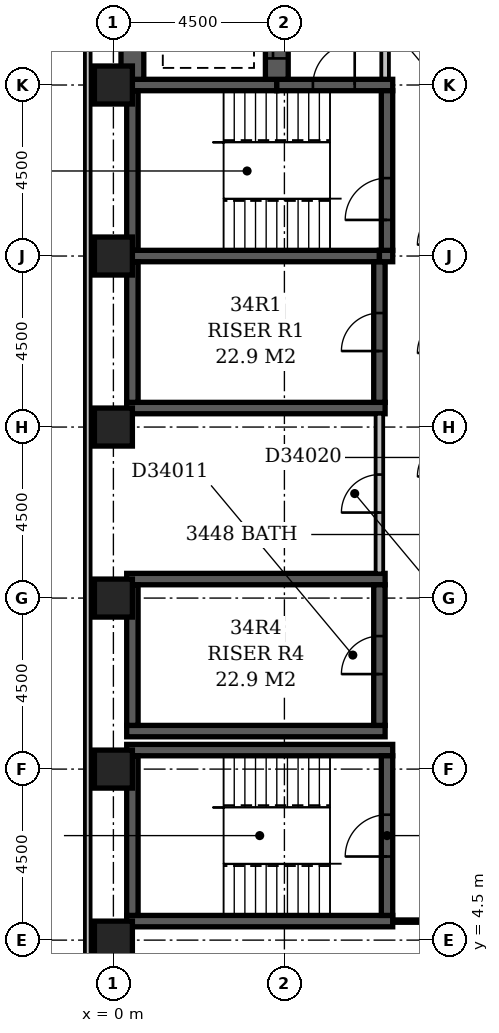
"""IFC4 building model, lengths in metres.
Left out: names, types, materials, properties, quantities, classifications, styles, units other than length and angle.
Written with IfcOpenShell. Run it as: python <this file> out.ifc"""

import sys

from ifc_helpers import new_model, si_unit, direction, frame, frame_2d, origin, origin_2d, place, context, subcontext, project, spatial, rectangle, extrude, element, fill, save


model = new_model("IFC4")
c1 = context("Model", 3, precision=1e-05, world=origin(), true_north=direction((0.0, 1.0)))
c2 = subcontext(c1, "Body", "Model", "MODEL_VIEW")
j1 = project(units=[si_unit("LENGTHUNIT", "METRE"), si_unit("PLANEANGLEUNIT", "RADIAN")], contexts=[c1])
p1 = place(None, origin())
s1 = spatial("IfcSite", under=j1, at=p1, CompositionType="ELEMENT")
p2 = place(p1, origin())
s2 = spatial("IfcBuilding", under=s1, at=p2, CompositionType="ELEMENT")
p3 = place(p2, frame((0.0, 0.0, 137.6)))
s3 = spatial("IfcBuildingStorey", under=s2, at=p3, CompositionType="ELEMENT", Elevation=137.6)
for number, where, z_axis, x_axis in (
    (1, (0.35, 5.0, -0.3), (0.0, 0.0, 1.0), (1.0, 0.0, 0.0)),
    (2, (0.35, 9.5, -0.3), (0.0, 0.0, 1.0), (1.0, 0.0, 0.0)),
):
    element("IfcWall", number, at=place(p3, frame(where, z_axis=z_axis, x_axis=x_axis)), inside=s3, PredefinedType="SHEAR", context=c2, shape_type="SweptSolid", body=[
        extrude(rectangle(XDim=7.0, YDim=0.3, at=frame_2d((3.5, 0.0))), origin(), (0.0, 0.0, 1.0), 3.6),
    ])
for number, where, z_axis, x_axis in (
    (3, (0.35, 10.0, -0.3), (0.0, 0.0, 1.0), (1.0, 0.0, 0.0)),
    (4, (0.35, 14.0, -0.3), (0.0, 0.0, 1.0), (1.0, 0.0, 0.0)),
    (5, (0.35, 18.5, -0.3), (0.0, 0.0, 1.0), (1.0, 0.0, 0.0)),
):
    element("IfcWall", number, at=place(p3, frame(where, z_axis=z_axis, x_axis=x_axis)), inside=s3, PredefinedType="SHEAR", context=c2, shape_type="SweptSolid", body=[
        extrude(rectangle(XDim=6.8, YDim=0.3, at=frame_2d((3.4, 0.0))), origin(), (0.0, 0.0, 1.0), 3.6),
    ])
p4 = place(p3, frame((0.35, 22.5, -0.3), z_axis=(0.0, 0.0, 1.0), x_axis=(1.0, 0.0, 0.0)))
e6 = element("IfcWall", 6, at=p4, inside=s3, PredefinedType="SHEAR", context=c2, shape_type="SweptSolid", body=[
    extrude(rectangle(XDim=6.65, YDim=0.3, at=frame_2d((3.325, 0.0))), origin(), (0.0, 0.0, 1.0), 3.6),
])
p5 = place(p3, frame((0.35, 27.0, -0.3), z_axis=(0.0, 0.0, 1.0), x_axis=(1.0, 0.0, 0.0)))
e7 = element("IfcWall", 7, at=p5, inside=s3, PredefinedType="SHEAR", context=c2, shape_type="SweptSolid", body=[
    extrude(rectangle(XDim=3.95, YDim=0.3, at=frame_2d((1.975, 0.0))), origin(), (0.0, 0.0, 1.0), 3.6),
])
p6 = place(p3, frame((0.5, 5.15, -0.3), z_axis=(0.0, 0.0, 1.0), x_axis=(0.0, 1.0, 0.0)))
e8 = element("IfcWall", 8, at=p6, inside=s3, PredefinedType="SHEAR", context=c2, shape_type="SweptSolid", body=[
    extrude(rectangle(XDim=4.2, YDim=0.3, at=frame_2d((2.1, 0.0))), origin(), (0.0, 0.0, 1.0), 3.6),
])
for number, where, z_axis, x_axis in (
    (9, (0.5, 10.15, -0.3), (0.0, 0.0, 1.0), (0.0, 1.0, 0.0)),
    (10, (0.5, 18.65, -0.3), (0.0, 0.0, 1.0), (0.0, 1.0, 0.0)),
):
    element("IfcWall", number, at=place(p3, frame(where, z_axis=z_axis, x_axis=x_axis)), inside=s3, PredefinedType="SHEAR", context=c2, shape_type="SweptSolid", body=[
        extrude(rectangle(XDim=3.7, YDim=0.3, at=frame_2d((1.85, 0.0))), origin(), (0.0, 0.0, 1.0), 3.6),
    ])
p7 = place(p3, frame((0.5, 22.65, -0.3), z_axis=(0.0, 0.0, 1.0), x_axis=(0.0, 1.0, 0.0)))
e11 = element("IfcWall", 11, at=p7, inside=s3, PredefinedType="SHEAR", context=c2, shape_type="SweptSolid", body=[
    extrude(rectangle(XDim=4.2, YDim=0.3, at=frame_2d((2.1, 0.0))), origin(), (0.0, 0.0, 1.0), 3.6),
])
p8 = place(p3, frame((0.5, 27.15, -0.3), z_axis=(0.0, 0.0, 1.0), x_axis=(0.0, 1.0, 0.0)))
e12 = element("IfcWall", 12, at=p8, inside=s3, PredefinedType="SHEAR", context=c2, shape_type="SweptSolid", body=[
    extrude(rectangle(XDim=22.05, YDim=0.6, at=frame_2d((11.025, 0.0))), origin(), (0.0, 0.0, 1.0), 3.6),
])
p9 = place(p3, frame((4.3, 27.0, -0.3), z_axis=(0.0, 0.0, 1.0), x_axis=(1.0, 0.0, 0.0)))
e13 = element("IfcWall", 13, at=p9, inside=s3, PredefinedType="SHEAR", context=c2, shape_type="SweptSolid", body=[
    extrude(rectangle(XDim=3.05, YDim=0.3, at=frame_2d((1.525, 0.0))), origin(), (0.0, 0.0, 1.0), 3.6),
])
p10 = place(p9, frame((0.95, 0.0, 0.3)))
e14 = element("IfcOpeningElement", 14, at=p10, cuts=e13, PredefinedType="OPENING", context=c2, shape_type="SweptSolid", body=[
    extrude(rectangle(XDim=1.1, YDim=2.1, at=frame_2d((0.55, 1.05))), frame((0.0, 0.162, 0.0), z_axis=(0.0, -1.0, 0.0), x_axis=(1.0, 0.0, 0.0)), (0.0, 0.0, 1.0), 0.324),
])
p11 = place(p3, frame((4.3, 27.15, -0.3), z_axis=(0.0, 0.0, 1.0), x_axis=(0.0, 1.0, 0.0)))
e15 = element("IfcWall", 15, at=p11, inside=s3, PredefinedType="SHEAR", context=c2, shape_type="SweptSolid", body=[
    extrude(rectangle(XDim=22.05, YDim=0.6, at=frame_2d((11.025, 0.0))), origin(), (0.0, 0.0, 1.0), 3.6),
])
p12 = place(p11, frame((3.05, 0.0, 0.3)))
e16 = element("IfcOpeningElement", 16, at=p12, cuts=e15, PredefinedType="OPENING", context=c2, shape_type="SweptSolid", body=[
    extrude(rectangle(XDim=1.1, YDim=2.1, at=frame_2d((0.55, 1.05))), frame((0.0, 0.312, 0.0), z_axis=(0.0, -1.0, 0.0), x_axis=(1.0, 0.0, 0.0)), (0.0, 0.0, 1.0), 0.624),
])
p13 = place(p11, frame((0.55, 0.0, 0.3)))
e17 = element("IfcOpeningElement", 17, at=p13, cuts=e15, PredefinedType="OPENING", context=c2, shape_type="SweptSolid", body=[
    extrude(rectangle(XDim=1.1, YDim=2.1, at=frame_2d((0.55, 1.05))), frame((0.0, 0.312, 0.0), z_axis=(0.0, -1.0, 0.0), x_axis=(1.0, 0.0, 0.0)), (0.0, 0.0, 1.0), 0.624),
])
p14 = place(p11, frame((20.55, 0.0, 0.3)))
e18 = element("IfcOpeningElement", 18, at=p14, cuts=e15, PredefinedType="OPENING", context=c2, shape_type="SweptSolid", body=[
    extrude(rectangle(XDim=1.1, YDim=2.1, at=frame_2d((0.55, 1.05))), frame((0.0, 0.312, 0.0), z_axis=(0.0, -1.0, 0.0), x_axis=(1.0, 0.0, 0.0)), (0.0, 0.0, 1.0), 0.624),
])
p15 = place(p11, frame((18.05, 0.0, 0.3)))
e19 = element("IfcOpeningElement", 19, at=p15, cuts=e15, PredefinedType="OPENING", context=c2, shape_type="SweptSolid", body=[
    extrude(rectangle(XDim=1.1, YDim=2.1, at=frame_2d((0.55, 1.05))), frame((0.0, 0.312, 0.0), z_axis=(0.0, -1.0, 0.0), x_axis=(1.0, 0.0, 0.0)), (0.0, 0.0, 1.0), 0.624),
])
p16 = place(p11, frame((15.55, 0.0, 0.3)))
e20 = element("IfcOpeningElement", 20, at=p16, cuts=e15, PredefinedType="OPENING", context=c2, shape_type="SweptSolid", body=[
    extrude(rectangle(XDim=1.1, YDim=2.1, at=frame_2d((0.55, 1.05))), frame((0.0, 0.312, 0.0), z_axis=(0.0, -1.0, 0.0), x_axis=(1.0, 0.0, 0.0)), (0.0, 0.0, 1.0), 0.624),
])
p17 = place(p11, frame((13.05, 0.0, 0.3)))
e21 = element("IfcOpeningElement", 21, at=p17, cuts=e15, PredefinedType="OPENING", context=c2, shape_type="SweptSolid", body=[
    extrude(rectangle(XDim=1.1, YDim=2.1, at=frame_2d((0.55, 1.05))), frame((0.0, 0.312, 0.0), z_axis=(0.0, -1.0, 0.0), x_axis=(1.0, 0.0, 0.0)), (0.0, 0.0, 1.0), 0.624),
])
p18 = place(p11, frame((10.55, 0.0, 0.3)))
e22 = element("IfcOpeningElement", 22, at=p18, cuts=e15, PredefinedType="OPENING", context=c2, shape_type="SweptSolid", body=[
    extrude(rectangle(XDim=1.1, YDim=2.1, at=frame_2d((0.55, 1.05))), frame((0.0, 0.312, 0.0), z_axis=(0.0, -1.0, 0.0), x_axis=(1.0, 0.0, 0.0)), (0.0, 0.0, 1.0), 0.624),
])
p19 = place(p11, frame((8.05, 0.0, 0.3)))
e23 = element("IfcOpeningElement", 23, at=p19, cuts=e15, PredefinedType="OPENING", context=c2, shape_type="SweptSolid", body=[
    extrude(rectangle(XDim=1.1, YDim=2.1, at=frame_2d((0.55, 1.05))), frame((0.0, 0.312, 0.0), z_axis=(0.0, -1.0, 0.0), x_axis=(1.0, 0.0, 0.0)), (0.0, 0.0, 1.0), 0.624),
])
p20 = place(p11, frame((5.55, 0.0, 0.3)))
e24 = element("IfcOpeningElement", 24, at=p20, cuts=e15, PredefinedType="OPENING", context=c2, shape_type="SweptSolid", body=[
    extrude(rectangle(XDim=1.1, YDim=2.1, at=frame_2d((0.55, 1.05))), frame((0.0, 0.312, 0.0), z_axis=(0.0, -1.0, 0.0), x_axis=(1.0, 0.0, 0.0)), (0.0, 0.0, 1.0), 0.624),
])
p21 = place(p3, frame((7.0, 10.15, -0.3), z_axis=(0.0, 0.0, 1.0), x_axis=(0.0, 1.0, 0.0)))
e25 = element("IfcWall", 25, at=p21, inside=s3, PredefinedType="SHEAR", context=c2, shape_type="SweptSolid", body=[
    extrude(rectangle(XDim=3.7, YDim=0.3, at=frame_2d((1.85, 0.0))), origin(), (0.0, 0.0, 1.0), 3.6),
])
p22 = place(p21, frame((1.35, 0.0, 0.3)))
e26 = element("IfcOpeningElement", 26, at=p22, cuts=e25, PredefinedType="OPENING", context=c2, shape_type="SweptSolid", body=[
    extrude(rectangle(XDim=1.0, YDim=2.1, at=frame_2d((0.5, 1.05))), frame((0.0, 0.162, 0.0), z_axis=(0.0, -1.0, 0.0), x_axis=(1.0, 0.0, 0.0)), (0.0, 0.0, 1.0), 0.324),
])
p23 = place(p3, frame((7.0, 18.65, -0.3), z_axis=(0.0, 0.0, 1.0), x_axis=(0.0, 1.0, 0.0)))
e27 = element("IfcWall", 27, at=p23, inside=s3, PredefinedType="SHEAR", context=c2, shape_type="SweptSolid", body=[
    extrude(rectangle(XDim=3.7, YDim=0.3, at=frame_2d((1.85, 0.0))), origin(), (0.0, 0.0, 1.0), 3.6),
])
p24 = place(p23, frame((1.35, 0.0, 0.3)))
e28 = element("IfcOpeningElement", 28, at=p24, cuts=e27, PredefinedType="OPENING", context=c2, shape_type="SweptSolid", body=[
    extrude(rectangle(XDim=1.0, YDim=2.1, at=frame_2d((0.5, 1.05))), frame((0.0, 0.162, 0.0), z_axis=(0.0, -1.0, 0.0), x_axis=(1.0, 0.0, 0.0)), (0.0, 0.0, 1.0), 0.324),
])
p25 = place(p3, frame((7.0, 22.5, -0.3), z_axis=(0.0, 0.0, 1.0), x_axis=(1.0, 0.0, 0.0)))
e29 = element("IfcWall", 29, at=p25, inside=s3, PredefinedType="SHEAR", context=c2, shape_type="SweptSolid", body=[
    extrude(rectangle(XDim=0.35, YDim=0.3, at=frame_2d((0.175, 0.0))), origin(), (0.0, 0.0, 1.0), 3.6),
])
p26 = place(p3, frame((7.2, 5.15, -0.3), z_axis=(0.0, 0.0, 1.0), x_axis=(0.0, 1.0, 0.0)))
e30 = element("IfcWall", 30, at=p26, inside=s3, PredefinedType="SHEAR", context=c2, shape_type="SweptSolid", body=[
    extrude(rectangle(XDim=4.2, YDim=0.3, at=frame_2d((2.1, 0.0))), origin(), (0.0, 0.0, 1.0), 3.6),
])
p27 = place(p26, frame((1.55, 0.0, 0.3)))
e31 = element("IfcOpeningElement", 31, at=p27, cuts=e30, PredefinedType="OPENING", context=c2, shape_type="SweptSolid", body=[
    extrude(rectangle(XDim=1.1, YDim=2.1, at=frame_2d((0.55, 1.05))), frame((0.0, 0.162, 0.0), z_axis=(0.0, -1.0, 0.0), x_axis=(1.0, 0.0, 0.0)), (0.0, 0.0, 1.0), 0.324),
])
p28 = place(p3, frame((7.2, 22.65, -0.3), z_axis=(0.0, 0.0, 1.0), x_axis=(0.0, 1.0, 0.0)))
e32 = element("IfcWall", 32, at=p28, inside=s3, PredefinedType="SHEAR", context=c2, shape_type="SweptSolid", body=[
    extrude(rectangle(XDim=4.2, YDim=0.3, at=frame_2d((2.1, 0.0))), origin(), (0.0, 0.0, 1.0), 3.6),
])
p29 = place(p28, frame((0.8, 0.0, 0.3)))
e33 = element("IfcOpeningElement", 33, at=p29, cuts=e32, PredefinedType="OPENING", context=c2, shape_type="SweptSolid", body=[
    extrude(rectangle(XDim=1.1, YDim=2.1, at=frame_2d((0.55, 1.05))), frame((0.0, 0.162, 0.0), z_axis=(0.0, -1.0, 0.0), x_axis=(1.0, 0.0, 0.0)), (0.0, 0.0, 1.0), 0.324),
])
for number, where, z_axis, x_axis in (
    (34, (0.0, 4.5, -0.3), (0.0, 0.0, 1.0), (1.0, 0.0, 0.0)),
    (35, (0.0, 9.0, -0.3), (0.0, 0.0, 1.0), (1.0, 0.0, 0.0)),
    (36, (0.0, 13.5, -0.3), (0.0, 0.0, 1.0), (1.0, 0.0, 0.0)),
    (37, (0.0, 18.0, -0.3), (0.0, 0.0, 1.0), (1.0, 0.0, 0.0)),
    (38, (0.0, 22.5, -0.3), (0.0, 0.0, 1.0), (1.0, 0.0, 0.0)),
    (39, (0.0, 27.0, -0.3), (0.0, 0.0, 1.0), (1.0, 0.0, 0.0)),
):
    element("IfcColumn", number, at=place(p3, frame(where, z_axis=z_axis, x_axis=x_axis)), inside=s3, PredefinedType="COLUMN", context=c2, shape_type="SweptSolid", body=[
        extrude(rectangle(XDim=1.0, YDim=1.0, at=origin_2d()), origin(), (0.0, 0.0, 1.0), 3.6),
    ])
p30 = place(p3, frame((-0.675, 59.1, 0.0), z_axis=(0.0, 0.0, 1.0), x_axis=(0.0, -1.0, 0.0)))
e40 = element("IfcWall", 40, at=p30, inside=s3, PredefinedType="STANDARD", context=c2, shape_type="SweptSolid", body=[
    extrude(rectangle(XDim=55.35, YDim=0.15, at=frame_2d((27.675, 0.0))), origin(), (0.0, 0.0, 1.0), 2.7),
])
p31 = place(p3, frame((7.15, 27.17, 0.0), z_axis=(0.0, 0.0, 1.0), x_axis=(0.0, 1.0, 0.0)))
e41 = element("IfcWall", 41, at=p31, inside=s3, PredefinedType="PARTITIONING", context=c2, shape_type="SweptSolid", body=[
    extrude(rectangle(XDim=4.83, YDim=0.2, at=frame_2d((2.415, 0.0))), origin(), (0.0, 0.0, 1.0), 3.3),
])
p32 = place(p31, frame((1.73, 0.0, 0.0)))
e42 = element("IfcOpeningElement", 42, at=p32, cuts=e41, PredefinedType="OPENING", context=c2, shape_type="SweptSolid", body=[
    extrude(rectangle(XDim=1.2, YDim=2.1, at=frame_2d((0.6, 1.05))), frame((0.0, 0.112, 0.0), z_axis=(0.0, -1.0, 0.0), x_axis=(1.0, 0.0, 0.0)), (0.0, 0.0, 1.0), 0.224),
])
p33 = place(p3, frame((0.0, 4.5, 0.0), z_axis=(0.0, 0.0, 1.0), x_axis=(0.0, 1.0, 0.0)))
e43 = element("IfcWall", 43, at=p33, inside=s3, PredefinedType="PARTITIONING", context=c2, shape_type="SweptSolid", body=[
    extrude(rectangle(XDim=0.5, YDim=0.1, at=frame_2d((0.25, 0.0))), origin(), (0.0, 0.0, 1.0), 2.7),
])
p34 = place(p3, frame((7.349, 5.0, 0.0), z_axis=(0.0, 0.0, 1.0), x_axis=(1.0, 0.0, 0.0)))
e44 = element("IfcWall", 44, at=p34, inside=s3, PredefinedType="PARTITIONING", context=c2, shape_type="SweptSolid", body=[
    extrude(rectangle(XDim=1.551, YDim=0.1, at=frame_2d((0.775, 0.0))), origin(), (0.0, 0.0, 1.0), 3.3),
])
p35 = place(p3, frame((7.0, 14.15, 0.0), z_axis=(0.0, 0.0, 1.0), x_axis=(0.0, 1.0, 0.0)))
e45 = element("IfcWall", 45, at=p35, inside=s3, PredefinedType="PARTITIONING", context=c2, shape_type="SweptSolid", body=[
    extrude(rectangle(XDim=4.2, YDim=0.2, at=frame_2d((2.1, 0.0))), origin(), (0.0, 0.0, 1.0), 3.3),
])
p36 = place(p35, frame((1.6, 0.0, 0.0)))
e46 = element("IfcOpeningElement", 46, at=p36, cuts=e45, PredefinedType="OPENING", context=c2, shape_type="SweptSolid", body=[
    extrude(rectangle(XDim=1.0, YDim=2.1, at=frame_2d((0.5, 1.05))), frame((0.0, 0.112, 0.0), z_axis=(0.0, -1.0, 0.0), x_axis=(1.0, 0.0, 0.0)), (0.0, 0.0, 1.0), 0.224),
])
p37 = place(p13, origin())
e47 = element("IfcDoor", 47, at=p37, inside=s3, OperationType="SLIDING_TO_LEFT", PredefinedType="DOOR", context=c2, shape_type="SweptSolid", body=[
    extrude(rectangle(XDim=1.1, YDim=2.1, at=frame_2d((0.55, 1.05))), frame((0.0, 0.025, 0.0), z_axis=(0.0, -1.0, 0.0), x_axis=(1.0, 0.0, 0.0)), (0.0, 0.0, 1.0), 0.05),
])
fill(e17, e47)
p38 = place(p24, origin())
e48 = element("IfcDoor", 48, at=p38, inside=s3, OperationType="SINGLE_SWING_LEFT", PredefinedType="DOOR", context=c2, shape_type="SweptSolid", body=[
    extrude(rectangle(XDim=1.0, YDim=2.1, at=frame_2d((0.5, 1.05))), frame((0.0, 0.025, 0.0), z_axis=(0.0, -1.0, 0.0), x_axis=(1.0, 0.0, 0.0)), (0.0, 0.0, 1.0), 0.05),
])
fill(e28, e48)
p39 = place(p22, origin())
e49 = element("IfcDoor", 49, at=p39, inside=s3, OperationType="SINGLE_SWING_LEFT", PredefinedType="DOOR", context=c2, shape_type="SweptSolid", body=[
    extrude(rectangle(XDim=1.0, YDim=2.1, at=frame_2d((0.5, 1.05))), frame((0.0, 0.025, 0.0), z_axis=(0.0, -1.0, 0.0), x_axis=(1.0, 0.0, 0.0)), (0.0, 0.0, 1.0), 0.05),
])
fill(e26, e49)
p40 = place(p10, frame((1.1, 0.0, 0.0), z_axis=(0.0, 0.0, 1.0), x_axis=(-1.0, 0.0, 0.0)))
e50 = element("IfcDoor", 50, at=p40, inside=s3, OperationType="SINGLE_SWING_LEFT", PredefinedType="DOOR", context=c2, shape_type="SweptSolid", body=[
    extrude(rectangle(XDim=1.1, YDim=2.1, at=frame_2d((0.55, 1.05))), frame((0.0, 0.025, 0.0), z_axis=(0.0, -1.0, 0.0), x_axis=(1.0, 0.0, 0.0)), (0.0, 0.0, 1.0), 0.05),
])
fill(e14, e50)
p41 = place(p29, origin())
e51 = element("IfcDoor", 51, at=p41, inside=s3, OperationType="SINGLE_SWING_LEFT", PredefinedType="DOOR", context=c2, shape_type="SweptSolid", body=[
    extrude(rectangle(XDim=1.1, YDim=2.1, at=frame_2d((0.55, 1.05))), frame((0.0, 0.025, 0.0), z_axis=(0.0, -1.0, 0.0), x_axis=(1.0, 0.0, 0.0)), (0.0, 0.0, 1.0), 0.05),
])
fill(e33, e51)
p42 = place(p27, origin())
e52 = element("IfcDoor", 52, at=p42, inside=s3, OperationType="SINGLE_SWING_LEFT", PredefinedType="DOOR", context=c2, shape_type="SweptSolid", body=[
    extrude(rectangle(XDim=1.1, YDim=2.1, at=frame_2d((0.55, 1.05))), frame((0.0, 0.025, 0.0), z_axis=(0.0, -1.0, 0.0), x_axis=(1.0, 0.0, 0.0)), (0.0, 0.0, 1.0), 0.05),
])
fill(e31, e52)
p43 = place(p36, origin())
e53 = element("IfcDoor", 53, at=p43, inside=s3, OperationType="SINGLE_SWING_LEFT", PredefinedType="DOOR", context=c2, shape_type="SweptSolid", body=[
    extrude(rectangle(XDim=1.0, YDim=2.1, at=frame_2d((0.5, 1.05))), frame((0.0, 0.025, 0.0), z_axis=(0.0, -1.0, 0.0), x_axis=(1.0, 0.0, 0.0)), (0.0, 0.0, 1.0), 0.05),
])
fill(e46, e53)
save(model, sys.argv[1])
